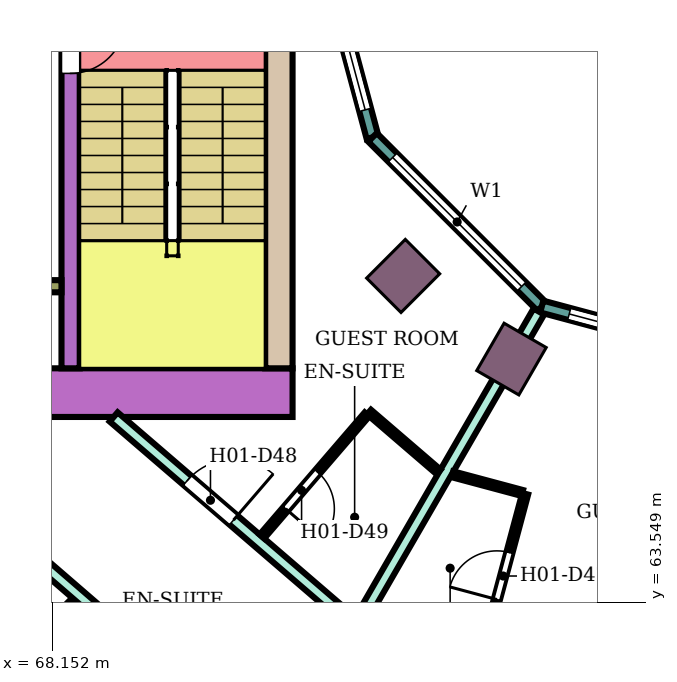
"""IFC4 building model, lengths in metres.
Left out: names, types, materials, properties, quantities, classifications, styles, units other than length and angle.
Written with IfcOpenShell. Run it as: python <this file> out.ifc"""

import sys

from ifc_helpers import new_model, si_unit, direction, frame, frame_2d, origin, origin_2d, place, context, subcontext, project, spatial, rectangle, extrude, element, fill, save


model = new_model("IFC4")
c1 = context("Model", 3, precision=1e-05, world=origin(), true_north=direction((0.0, 1.0)))
c2 = subcontext(c1, "Body", "Model", "MODEL_VIEW")
j1 = project(units=[si_unit("LENGTHUNIT", "METRE"), si_unit("PLANEANGLEUNIT", "RADIAN")], contexts=[c1])
p1 = place(None, origin())
s1 = spatial("IfcSite", under=j1, at=p1, CompositionType="ELEMENT")
p2 = place(p1, origin())
s2 = spatial("IfcBuilding", under=s1, at=p2, CompositionType="ELEMENT")
p3 = place(p2, frame((0.0, 0.0, 28.8)))
s3 = spatial("IfcBuildingStorey", under=s2, at=p3, CompositionType="ELEMENT", Elevation=28.8)
for number, where, z_axis, x_axis in (
    (1, (73.919, 68.919, 0.0), (0.0, 0.0, 1.0), (-0.707, -0.707, 0.0)),
    (2, (75.7, 67.552, 0.0), (0.0, 0.0, 1.0), (-0.5, -0.866, 0.0)),
):
    element("IfcColumn", number, at=place(p3, frame(where, z_axis=z_axis, x_axis=x_axis)), inside=s3, PredefinedType="COLUMN", context=c2, shape_type="SweptSolid", body=[
        extrude(rectangle(XDim=0.9, YDim=0.8, at=origin_2d()), origin(), (0.0, 0.0, 1.0), 3.8),
    ])
p4 = place(p3, frame((72.1, 67.0, 0.0), z_axis=(0.0, 0.0, 1.0), x_axis=(-1.0, 0.0, 0.0)))
e3 = element("IfcWall", 3, at=p4, inside=s3, PredefinedType="SHEAR", context=c2, shape_type="SweptSolid", body=[
    extrude(rectangle(XDim=14.7, YDim=0.8, at=frame_2d((7.35, 0.0))), origin(), (0.0, 0.0, 1.0), 3.48),
])
p5 = place(p4, frame((4.2, 0.0, 0.0)))
e4 = element("IfcOpeningElement", 4, at=p5, cuts=e3, PredefinedType="OPENING", context=c2, shape_type="SweptSolid", body=[
    extrude(rectangle(XDim=2.4, YDim=2.4, at=frame_2d((1.2, 1.2))), frame((0.0, 0.41, 0.0), z_axis=(0.0, -1.0, 0.0), x_axis=(1.0, 0.0, 0.0)), (0.0, 0.0, 1.0), 0.82),
])
p6 = place(p3, frame((71.875, 75.0, 0.0), z_axis=(0.0, 0.0, 1.0), x_axis=(0.0, -1.0, 0.0)))
e5 = element("IfcWall", 5, at=p6, inside=s3, PredefinedType="SHEAR", context=c2, shape_type="SweptSolid", body=[
    extrude(rectangle(XDim=7.6, YDim=0.45, at=frame_2d((3.8, 0.0))), origin(), (0.0, 0.0, 1.0), 3.48),
])
p7 = place(p3, frame((68.45, 75.0, 0.0), z_axis=(0.0, 0.0, 1.0), x_axis=(0.0, -1.0, 0.0)))
e6 = element("IfcWall", 6, at=p7, inside=s3, PredefinedType="SHEAR", context=c2, shape_type="SweptSolid", body=[
    extrude(rectangle(XDim=7.6, YDim=0.3, at=frame_2d((3.8, 0.0))), origin(), (0.0, 0.0, 1.0), 3.48),
])
p8 = place(p7, frame((1.85, 0.0, 0.0)))
e7 = element("IfcOpeningElement", 7, at=p8, cuts=e6, PredefinedType="OPENING", context=c2, shape_type="SweptSolid", body=[
    extrude(rectangle(XDim=0.9, YDim=2.1, at=frame_2d((0.45, 1.05))), frame((0.0, 0.16, 0.0), z_axis=(0.0, -1.0, 0.0), x_axis=(1.0, 0.0, 0.0)), (0.0, 0.0, 1.0), 0.32),
])
p9 = place(p3, frame((68.3, 68.75, 0.0), z_axis=(0.0, 0.0, 1.0), x_axis=(-1.0, 0.0, 0.0)))
e8 = element("IfcWall", 8, at=p9, inside=s3, PredefinedType="SHEAR", context=c2, shape_type="SweptSolid", body=[
    extrude(rectangle(XDim=4.65, YDim=0.2, at=frame_2d((2.325, 0.0))), origin(), (0.0, 0.0, 1.0), 3.48),
])
p10 = place(p3, frame((72.396, 75.0, 0.0), z_axis=(0.0, 0.0, 1.0), x_axis=(0.258789828301, -0.965933654434, 0.0)))
e9 = element("IfcWall", 9, at=p10, inside=s3, PredefinedType="NOTDEFINED", context=c2, shape_type="SweptSolid", body=[
    extrude(rectangle(XDim=3.936, YDim=0.2, at=frame_2d((1.968, 0.0))), origin(), (0.0, 0.0, 1.0), 3.8),
])
p11 = place(p10, frame((0.468, 0.0, 0.9)))
e10 = element("IfcOpeningElement", 10, at=p11, cuts=e9, PredefinedType="OPENING", context=c2, shape_type="SweptSolid", body=[
    extrude(rectangle(XDim=3.0, YDim=2.3, at=frame_2d((1.5, 1.15))), frame((0.0, 0.11, 0.0), z_axis=(0.0, -1.0, 0.0), x_axis=(1.0, 0.0, 0.0)), (0.0, 0.0, 1.0), 0.22),
])
p12 = place(p3, frame((73.415, 71.198, 0.0), z_axis=(0.0, 0.0, 1.0), x_axis=(0.707106781187, -0.707106781187, 0.0)))
e11 = element("IfcWall", 11, at=p12, inside=s3, PredefinedType="NOTDEFINED", context=c2, shape_type="SweptSolid", body=[
    extrude(rectangle(XDim=3.936, YDim=0.2, at=frame_2d((1.968, 0.0))), origin(), (0.0, 0.0, 1.0), 3.8),
])
p13 = place(p12, frame((0.468, 0.0, 0.9)))
e12 = element("IfcOpeningElement", 12, at=p13, cuts=e11, PredefinedType="OPENING", context=c2, shape_type="SweptSolid", body=[
    extrude(rectangle(XDim=3.0, YDim=2.3, at=frame_2d((1.5, 1.15))), frame((0.0, 0.11, 0.0), z_axis=(0.0, -1.0, 0.0), x_axis=(1.0, 0.0, 0.0)), (0.0, 0.0, 1.0), 0.22),
])
p14 = place(p3, frame((76.198, 68.415, 0.0), z_axis=(0.0, 0.0, 1.0), x_axis=(0.965933654434, -0.258789828301, 0.0)))
e13 = element("IfcWall", 13, at=p14, inside=s3, PredefinedType="NOTDEFINED", context=c2, shape_type="SweptSolid", body=[
    extrude(rectangle(XDim=3.936, YDim=0.2, at=frame_2d((1.968, 0.0))), origin(), (0.0, 0.0, 1.0), 3.8),
])
p15 = place(p14, frame((0.468, 0.0, 0.9)))
e14 = element("IfcOpeningElement", 14, at=p15, cuts=e13, PredefinedType="OPENING", context=c2, shape_type="SweptSolid", body=[
    extrude(rectangle(XDim=3.0, YDim=2.3, at=frame_2d((1.5, 1.15))), frame((0.0, 0.11, 0.0), z_axis=(0.0, -1.0, 0.0), x_axis=(1.0, 0.0, 0.0)), (0.0, 0.0, 1.0), 0.22),
])
p16 = place(p3, frame((63.592, 58.599, 0.0), z_axis=(0.0, 0.0, 1.0), x_axis=(0.707228748718, 0.706984792613, 0.0)))
e15 = element("IfcWall", 15, at=p16, inside=s3, PredefinedType="PARTITIONING", context=c2, shape_type="SweptSolid", body=[
    extrude(rectangle(XDim=7.005, YDim=0.2, at=frame_2d((3.503, 0.0))), origin(), (0.0, 0.0, 1.0), 3.35),
])
p17 = place(p3, frame((67.078, 64.968, 0.0), z_axis=(0.0, 0.0, 1.0), x_axis=(0.756371089567, -0.654142778656, 0.0)))
e16 = element("IfcWall", 16, at=p17, inside=s3, PredefinedType="PARTITIONING", context=c2, shape_type="SweptSolid", body=[
    extrude(rectangle(XDim=6.185, YDim=0.2, at=frame_2d((3.093, 0.0))), origin(), (0.0, 0.0, 1.0), 3.35),
])
p18 = place(p17, frame((4.755, 0.0, 0.0)))
e17 = element("IfcOpeningElement", 17, at=p18, cuts=e16, PredefinedType="OPENING", context=c2, shape_type="SweptSolid", body=[
    extrude(rectangle(XDim=1.0, YDim=2.1, at=frame_2d((0.5, 1.05))), frame((0.0, 0.11, 0.0), z_axis=(0.0, -1.0, 0.0), x_axis=(1.0, 0.0, 0.0)), (0.0, 0.0, 1.0), 0.22),
])
p19 = place(p3, frame((69.158, 66.6, 0.0), z_axis=(0.0, 0.0, 1.0), x_axis=(0.757976058094, -0.652282373943, 0.0)))
e18 = element("IfcWall", 18, at=p19, inside=s3, PredefinedType="PARTITIONING", context=c2, shape_type="SweptSolid", body=[
    extrude(rectangle(XDim=5.16, YDim=0.2, at=frame_2d((2.58, 0.0))), origin(), (0.0, 0.0, 1.0), 3.35),
])
p20 = place(p19, frame((1.6, 0.0, 0.0)))
e19 = element("IfcOpeningElement", 19, at=p20, cuts=e18, PredefinedType="OPENING", context=c2, shape_type="SweptSolid", body=[
    extrude(rectangle(XDim=1.0, YDim=2.1, at=frame_2d((0.5, 1.05))), frame((0.0, 0.11, 0.0), z_axis=(0.0, -1.0, 0.0), x_axis=(1.0, 0.0, 0.0)), (0.0, 0.0, 1.0), 0.22),
])
p21 = place(p3, frame((73.171, 63.177, 0.0), z_axis=(0.0, 0.0, 1.0), x_axis=(0.500257106344, 0.865876912472, 0.0)))
e20 = element("IfcWall", 20, at=p21, inside=s3, PredefinedType="PARTITIONING", context=c2, shape_type="SweptSolid", body=[
    extrude(rectangle(XDim=5.955, YDim=0.2, at=frame_2d((2.978, 0.0))), origin(), (0.0, 0.0, 1.0), 3.35),
])
p22 = place(p3, frame((71.596, 64.635, 0.0), z_axis=(0.0, 0.0, 1.0), x_axis=(0.652285007511, 0.757973791748, 0.0)))
e21 = element("IfcWall", 21, at=p22, inside=s3, PredefinedType="PARTITIONING", context=c2, shape_type="SweptSolid", body=[
    extrude(rectangle(XDim=2.65, YDim=0.1, at=frame_2d((1.325, 0.0))), origin(), (0.0, 0.0, 1.0), 3.35),
])
p23 = place(p22, frame((0.6, 0.0, 0.0)))
e22 = element("IfcOpeningElement", 22, at=p23, cuts=e21, PredefinedType="OPENING", context=c2, shape_type="SweptSolid", body=[
    extrude(rectangle(XDim=0.8, YDim=2.1, at=frame_2d((0.4, 1.05))), frame((0.0, 0.06, 0.0), z_axis=(0.0, -1.0, 0.0), x_axis=(1.0, 0.0, 0.0)), (0.0, 0.0, 1.0), 0.12),
])
p24 = place(p3, frame((73.357, 66.681, 0.0), z_axis=(0.0, 0.0, 1.0), x_axis=(0.758263469747, -0.651948242154, 0.0)))
e23 = element("IfcWall", 23, at=p24, inside=s3, PredefinedType="PARTITIONING", context=c2, shape_type="SweptSolid", body=[
    extrude(rectangle(XDim=1.511, YDim=0.1, at=frame_2d((0.755, 0.0))), origin(), (0.0, 0.0, 1.0), 3.35),
])
p25 = place(p3, frame((74.729, 65.657, 0.0), z_axis=(0.0, 0.0, 1.0), x_axis=(0.965948051503, -0.258736085224, 0.0)))
e24 = element("IfcWall", 24, at=p25, inside=s3, PredefinedType="PARTITIONING", context=c2, shape_type="SweptSolid", body=[
    extrude(rectangle(XDim=1.189, YDim=0.1, at=frame_2d((0.594, 0.0))), origin(), (0.0, 0.0, 1.0), 3.35),
])
p26 = place(p3, frame((75.227, 62.729, 0.0), z_axis=(0.0, 0.0, 1.0), x_axis=(0.258945475746, 0.965891940432, 0.0)))
e25 = element("IfcWall", 25, at=p26, inside=s3, PredefinedType="PARTITIONING", context=c2, shape_type="SweptSolid", body=[
    extrude(rectangle(XDim=2.7, YDim=0.1, at=frame_2d((1.35, 0.0))), origin(), (0.0, 0.0, 1.0), 3.35),
])
p27 = place(p26, frame((0.9, 0.0, 0.0)))
e26 = element("IfcOpeningElement", 26, at=p27, cuts=e25, PredefinedType="OPENING", context=c2, shape_type="SweptSolid", body=[
    extrude(rectangle(XDim=0.8, YDim=2.1, at=frame_2d((0.4, 1.05))), frame((0.0, 0.06, 0.0), z_axis=(0.0, -1.0, 0.0), x_axis=(1.0, 0.0, 0.0)), (0.0, 0.0, 1.0), 0.12),
])
p28 = place(p11, origin())
e27 = element("IfcWindow", 27, at=p28, inside=s3, PartitioningType="SINGLE_PANEL", PredefinedType="WINDOW", context=c2, shape_type="SweptSolid", body=[
    extrude(rectangle(XDim=3.0, YDim=2.3, at=frame_2d((1.5, 1.15))), frame((0.0, 0.03, 0.0), z_axis=(0.0, -1.0, 0.0), x_axis=(1.0, 0.0, 0.0)), (0.0, 0.0, 1.0), 0.06),
])
fill(e10, e27)
p29 = place(p13, origin())
e28 = element("IfcWindow", 28, at=p29, inside=s3, PartitioningType="SINGLE_PANEL", PredefinedType="WINDOW", context=c2, shape_type="SweptSolid", body=[
    extrude(rectangle(XDim=3.0, YDim=2.3, at=frame_2d((1.5, 1.15))), frame((0.0, 0.03, 0.0), z_axis=(0.0, -1.0, 0.0), x_axis=(1.0, 0.0, 0.0)), (0.0, 0.0, 1.0), 0.06),
])
fill(e12, e28)
p30 = place(p15, origin())
e29 = element("IfcWindow", 29, at=p30, inside=s3, PartitioningType="SINGLE_PANEL", PredefinedType="WINDOW", context=c2, shape_type="SweptSolid", body=[
    extrude(rectangle(XDim=3.0, YDim=2.3, at=frame_2d((1.5, 1.15))), frame((0.0, 0.03, 0.0), z_axis=(0.0, -1.0, 0.0), x_axis=(1.0, 0.0, 0.0)), (0.0, 0.0, 1.0), 0.06),
])
fill(e14, e29)
p31 = place(p27, origin())
e30 = element("IfcDoor", 30, at=p31, inside=s3, OperationType="SINGLE_SWING_LEFT", PredefinedType="DOOR", context=c2, shape_type="SweptSolid", body=[
    extrude(rectangle(XDim=0.8, YDim=2.1, at=frame_2d((0.4, 1.05))), frame((0.0, 0.025, 0.0), z_axis=(0.0, -1.0, 0.0), x_axis=(1.0, 0.0, 0.0)), (0.0, 0.0, 1.0), 0.05),
])
fill(e26, e30)
p32 = place(p20, origin())
e31 = element("IfcDoor", 31, at=p32, inside=s3, OperationType="SINGLE_SWING_RIGHT", PredefinedType="DOOR", context=c2, shape_type="SweptSolid", body=[
    extrude(rectangle(XDim=1.0, YDim=2.1, at=frame_2d((0.5, 1.05))), frame((0.0, 0.025, 0.0), z_axis=(0.0, -1.0, 0.0), x_axis=(1.0, 0.0, 0.0)), (0.0, 0.0, 1.0), 0.05),
])
fill(e19, e31)
p33 = place(p23, frame((0.8, 0.0, 0.0), z_axis=(0.0, 0.0, 1.0), x_axis=(-1.0, 0.0, 0.0)))
e32 = element("IfcDoor", 32, at=p33, inside=s3, OperationType="SINGLE_SWING_RIGHT", PredefinedType="DOOR", context=c2, shape_type="SweptSolid", body=[
    extrude(rectangle(XDim=0.8, YDim=2.1, at=frame_2d((0.4, 1.05))), frame((0.0, 0.025, 0.0), z_axis=(0.0, -1.0, 0.0), x_axis=(1.0, 0.0, 0.0)), (0.0, 0.0, 1.0), 0.05),
])
fill(e22, e32)
p34 = place(p8, origin())
e33 = element("IfcDoor", 33, at=p34, inside=s3, OperationType="SINGLE_SWING_LEFT", PredefinedType="DOOR", context=c2, shape_type="SweptSolid", body=[
    extrude(rectangle(XDim=0.9, YDim=2.1, at=frame_2d((0.45, 1.05))), frame((0.0, 0.025, 0.0), z_axis=(0.0, -1.0, 0.0), x_axis=(1.0, 0.0, 0.0)), (0.0, 0.0, 1.0), 0.05),
])
fill(e7, e33)
save(model, sys.argv[1])
